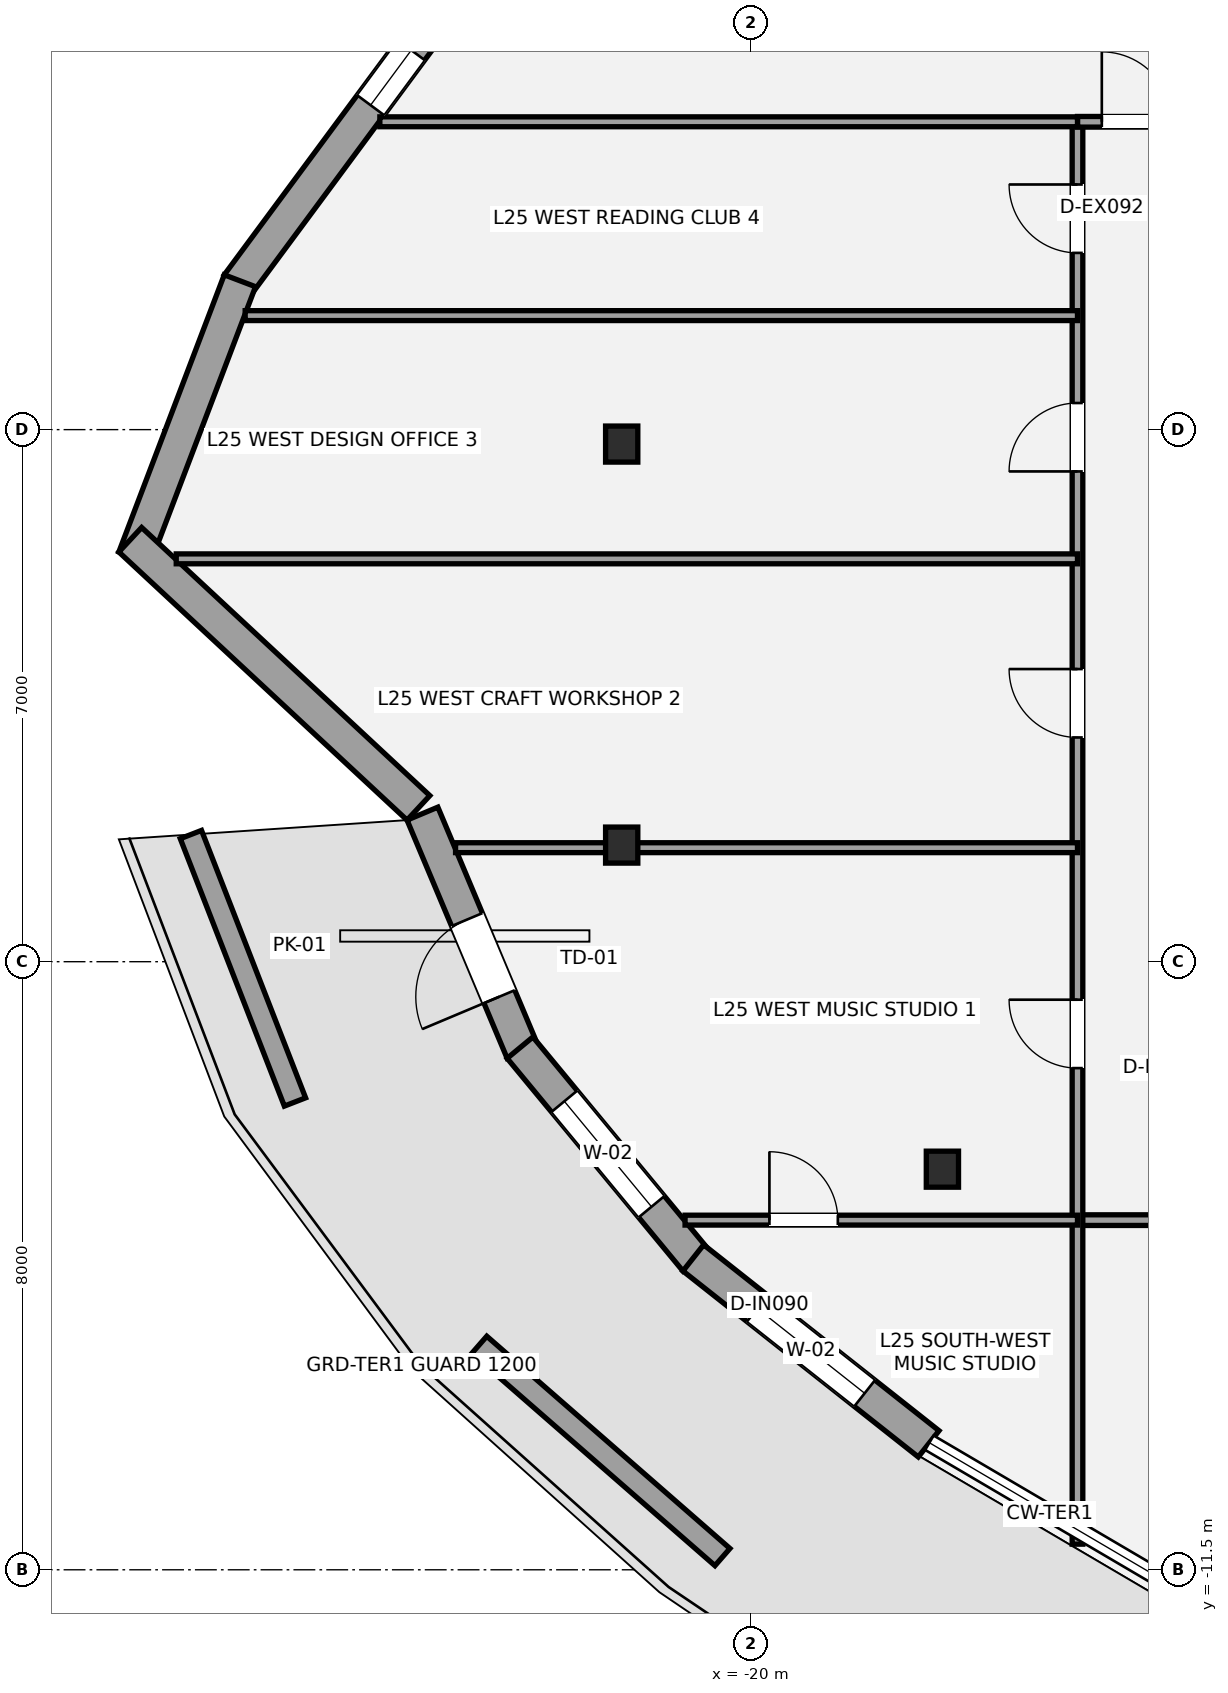
"""IFC4 building model, lengths in metres.
Left out: names, types, materials, properties, quantities, classifications, styles, units other than length and angle.
Written with IfcOpenShell. Run it as: python <this file> out.ifc"""

import sys

from ifc_helpers import new_model, si_unit, direction, frame, frame_2d, origin, origin_2d, place, context, subcontext, project, spatial, rectangle, i_section, extrude, element, fill, save


model = new_model("IFC4")
c1 = context("Model", 3, precision=1e-05, world=origin(), true_north=direction((0.0, 1.0)))
c2 = subcontext(c1, "Body", "Model", "MODEL_VIEW")
j1 = project(units=[si_unit("LENGTHUNIT", "METRE"), si_unit("PLANEANGLEUNIT", "RADIAN")], contexts=[c1])
p1 = place(None, origin())
s1 = spatial("IfcSite", under=j1, at=p1, CompositionType="ELEMENT")
p2 = place(p1, origin())
s2 = spatial("IfcBuilding", under=s1, at=p2, CompositionType="ELEMENT")
p3 = place(p2, frame((0.0, 0.0, 96.6)))
s3 = spatial("IfcBuildingStorey", under=s2, at=p3, CompositionType="ELEMENT", Elevation=96.6)
for number, where, z_axis, x_axis in (
    (1, (-21.697, 3.31, 0.0), (0.0, 0.0, 1.0), (1.0, 0.0, 0.0)),
    (2, (-21.697, -1.966, 0.0), (0.0, 0.0, 1.0), (1.0, 0.0, 0.0)),
    (3, (-17.477, -6.229, 0.0), (0.0, 0.0, 1.0), (1.0, 0.0, 0.0)),
):
    element("IfcColumn", number, at=place(p3, frame(where, z_axis=z_axis, x_axis=x_axis)), inside=s3, PredefinedType="COLUMN", context=c2, shape_type="SweptSolid", body=[
        extrude(i_section(OverallWidth=0.424, OverallDepth=0.474, WebThickness=0.048, FlangeThickness=0.077, at=origin_2d()), origin(), (0.0, 0.0, 1.0), 3.5),
    ])
p4 = place(p3, frame((-26.749, 5.406, 0.0), z_axis=(0.0, 0.0, 1.0), x_axis=(0.594853677057, 0.803834002075, 0.0)))
e4 = element("IfcWall", 4, at=p4, inside=s3, PredefinedType="STANDARD", context=c2, shape_type="SweptSolid", body=[
    extrude(rectangle(XDim=4.139, YDim=0.44, at=frame_2d((2.07, 0.0))), origin(), (0.0, 0.0, 1.0), 2.528),
])
p5 = place(p4, frame((2.939, 0.0, 0.58)))
e5 = element("IfcOpeningElement", 5, at=p5, cuts=e4, PredefinedType="OPENING", context=c2, shape_type="SweptSolid", body=[
    extrude(rectangle(XDim=0.9, YDim=1.35, at=frame_2d((0.45, 0.675))), frame((0.0, 0.23, 0.0), z_axis=(0.0, -1.0, 0.0), x_axis=(1.0, 0.0, 0.0)), (0.0, 0.0, 1.0), 0.46),
])
p6 = place(p3, frame((-28.107, 1.812, 0.0), z_axis=(0.0, 0.0, 1.0), x_axis=(0.355453982488, 0.93469378212, 0.0)))
e6 = element("IfcWall", 6, at=p6, inside=s3, PredefinedType="STANDARD", context=c2, shape_type="SweptSolid", body=[
    extrude(rectangle(XDim=3.901, YDim=0.44, at=frame_2d((1.951, 0.0))), origin(), (0.0, 0.0, 1.0), 2.528),
])
p7 = place(p3, frame((-24.371, -1.476, 0.0), z_axis=(0.0, 0.0, 1.0), x_axis=(-0.732150106649, 0.681143319231, 0.0)))
e7 = element("IfcWall", 7, at=p7, inside=s3, PredefinedType="STANDARD", context=c2, shape_type="SweptSolid", body=[
    extrude(rectangle(XDim=5.179, YDim=0.44, at=frame_2d((2.589, 0.0))), origin(), (0.0, 0.0, 1.0), 2.528),
])
p8 = place(p3, frame((-23.001, -4.686, 0.0), z_axis=(0.0, 0.0, 1.0), x_axis=(-0.387443695747, 0.92189336836, 0.0)))
e8 = element("IfcWall", 8, at=p8, inside=s3, PredefinedType="STANDARD", context=c2, shape_type="SweptSolid", body=[
    extrude(rectangle(XDim=3.4, YDim=0.44, at=frame_2d((1.7, 0.0))), origin(), (0.0, 0.0, 1.0), 2.532),
])
p9 = place(p8, frame((0.787, 0.0, 0.0)))
e9 = element("IfcOpeningElement", 9, at=p9, cuts=e8, PredefinedType="OPENING", context=c2, shape_type="SweptSolid", body=[
    extrude(rectangle(XDim=1.1, YDim=2.15, at=frame_2d((0.55, 1.075))), frame((0.0, 0.23, 0.0), z_axis=(0.0, -1.0, 0.0), x_axis=(1.0, 0.0, 0.0)), (0.0, 0.0, 1.0), 0.46),
])
p10 = place(p3, frame((-20.722, -7.429, 0.0), z_axis=(0.0, 0.0, 1.0), x_axis=(-0.637089984316, 0.770789434207, 0.0)))
e10 = element("IfcWall", 10, at=p10, inside=s3, PredefinedType="STANDARD", context=c2, shape_type="SweptSolid", body=[
    extrude(rectangle(XDim=3.63, YDim=0.44, at=frame_2d((1.815, 0.0))), origin(), (0.0, 0.0, 1.0), 2.532),
])
p11 = place(p10, frame((0.915, 0.0, 0.65)))
e11 = element("IfcOpeningElement", 11, at=p11, cuts=e10, PredefinedType="OPENING", context=c2, shape_type="SweptSolid", body=[
    extrude(rectangle(XDim=1.8, YDim=1.7, at=frame_2d((0.9, 0.85))), frame((0.0, 0.23, 0.0), z_axis=(0.0, -1.0, 0.0), x_axis=(1.0, 0.0, 0.0)), (0.0, 0.0, 1.0), 0.46),
])
p12 = place(p3, frame((-17.658, -9.843, 0.0), z_axis=(0.0, 0.0, 1.0), x_axis=(-0.784692700331, 0.619884961946, 0.0)))
e12 = element("IfcWall", 12, at=p12, inside=s3, PredefinedType="STANDARD", context=c2, shape_type="SweptSolid", body=[
    extrude(rectangle(XDim=3.946, YDim=0.44, at=frame_2d((1.973, 0.0))), origin(), (0.0, 0.0, 1.0), 2.532),
])
p13 = place(p12, frame((1.073, 0.0, 0.65)))
e13 = element("IfcOpeningElement", 13, at=p13, cuts=e12, PredefinedType="OPENING", context=c2, shape_type="SweptSolid", body=[
    extrude(rectangle(XDim=1.8, YDim=1.7, at=frame_2d((0.9, 0.85))), frame((0.0, 0.23, 0.0), z_axis=(0.0, -1.0, 0.0), x_axis=(1.0, 0.0, 0.0)), (0.0, 0.0, 1.0), 0.46),
])
p14 = place(p3, frame((-27.365, -1.827, 0.0), z_axis=(0.0, 0.0, 1.0), x_axis=(0.362633483576, -0.931931841172, 0.0)))
e14 = element("IfcWall", 14, at=p14, inside=s3, PredefinedType="PARAPET", context=c2, shape_type="SweptSolid", body=[
    extrude(rectangle(XDim=3.776, YDim=0.3, at=frame_2d((1.888, 0.0))), origin(), (0.0, 0.0, 1.0), 0.45),
])
p15 = place(p3, frame((-23.571, -8.54, 0.0), z_axis=(0.0, 0.0, 1.0), x_axis=(0.753398765677, -0.657563913149, 0.0)))
e15 = element("IfcWall", 15, at=p15, inside=s3, PredefinedType="PARAPET", context=c2, shape_type="SweptSolid", body=[
    extrude(rectangle(XDim=4.247, YDim=0.3, at=frame_2d((2.124, 0.0))), origin(), (0.0, 0.0, 1.0), 0.45),
])
p16 = place(p3, frame((-15.7, -6.9, 0.0), z_axis=(0.0, 0.0, 1.0), x_axis=(1.0, 0.0, 0.0)))
e16 = element("IfcWall", 16, at=p16, inside=s3, PredefinedType="PARTITIONING", context=c2, shape_type="SweptSolid", body=[
    extrude(rectangle(XDim=33.2, YDim=0.14, at=frame_2d((16.6, 0.0))), origin(), (0.0, 0.0, 1.0), 2.688),
])
p17 = place(p16, frame((3.15, 0.0, 0.0)))
e17 = element("IfcOpeningElement", 17, at=p17, cuts=e16, PredefinedType="OPENING", context=c2, shape_type="SweptSolid", body=[
    extrude(rectangle(XDim=0.9, YDim=2.1, at=frame_2d((0.45, 1.05))), frame((0.0, 0.08, 0.0), z_axis=(0.0, -1.0, 0.0), x_axis=(1.0, 0.0, 0.0)), (0.0, 0.0, 1.0), 0.16),
])
p18 = place(p16, frame((11.0, 0.0, 0.0)))
e18 = element("IfcOpeningElement", 18, at=p18, cuts=e16, PredefinedType="OPENING", context=c2, shape_type="SweptSolid", body=[
    extrude(rectangle(XDim=0.9, YDim=2.1, at=frame_2d((0.45, 1.05))), frame((0.0, 0.08, 0.0), z_axis=(0.0, -1.0, 0.0), x_axis=(1.0, 0.0, 0.0)), (0.0, 0.0, 1.0), 0.16),
])
p19 = place(p16, frame((19.5, 0.0, 0.0)))
e19 = element("IfcOpeningElement", 19, at=p19, cuts=e16, PredefinedType="OPENING", context=c2, shape_type="SweptSolid", body=[
    extrude(rectangle(XDim=0.9, YDim=2.1, at=frame_2d((0.45, 1.05))), frame((0.0, 0.08, 0.0), z_axis=(0.0, -1.0, 0.0), x_axis=(1.0, 0.0, 0.0)), (0.0, 0.0, 1.0), 0.16),
])
p20 = place(p16, frame((27.95, 0.0, 0.0)))
e20 = element("IfcOpeningElement", 20, at=p20, cuts=e16, PredefinedType="OPENING", context=c2, shape_type="SweptSolid", body=[
    extrude(rectangle(XDim=1.5, YDim=2.15, at=frame_2d((0.75, 1.075))), frame((0.0, 0.08, 0.0), z_axis=(0.0, -1.0, 0.0), x_axis=(1.0, 0.0, 0.0)), (0.0, 0.0, 1.0), 0.16),
])
p21 = place(p3, frame((-15.7, -11.163, 0.0), z_axis=(0.0, 0.0, 1.0), x_axis=(0.0, 1.0, 0.0)))
e21 = element("IfcWall", 21, at=p21, inside=s3, PredefinedType="PARTITIONING", context=c2, shape_type="SweptSolid", body=[
    extrude(rectangle(XDim=18.713, YDim=0.14, at=frame_2d((9.356, 0.0))), origin(), (0.0, 0.0, 1.0), 2.751),
])
p22 = place(p21, frame((6.263, 0.0, 0.0)))
e22 = element("IfcOpeningElement", 22, at=p22, cuts=e21, PredefinedType="OPENING", context=c2, shape_type="SweptSolid", body=[
    extrude(rectangle(XDim=0.9, YDim=2.1, at=frame_2d((0.45, 1.05))), frame((0.0, 0.08, 0.0), z_axis=(0.0, -1.0, 0.0), x_axis=(1.0, 0.0, 0.0)), (0.0, 0.0, 1.0), 0.16),
])
p23 = place(p21, frame((10.613, 0.0, 0.0)))
e23 = element("IfcOpeningElement", 23, at=p23, cuts=e21, PredefinedType="OPENING", context=c2, shape_type="SweptSolid", body=[
    extrude(rectangle(XDim=0.9, YDim=2.1, at=frame_2d((0.45, 1.05))), frame((0.0, 0.08, 0.0), z_axis=(0.0, -1.0, 0.0), x_axis=(1.0, 0.0, 0.0)), (0.0, 0.0, 1.0), 0.16),
])
p24 = place(p21, frame((14.113, 0.0, 0.0)))
e24 = element("IfcOpeningElement", 24, at=p24, cuts=e21, PredefinedType="OPENING", context=c2, shape_type="SweptSolid", body=[
    extrude(rectangle(XDim=0.9, YDim=2.1, at=frame_2d((0.45, 1.05))), frame((0.0, 0.08, 0.0), z_axis=(0.0, -1.0, 0.0), x_axis=(1.0, 0.0, 0.0)), (0.0, 0.0, 1.0), 0.16),
])
p25 = place(p21, frame((16.988, 0.0, 0.0)))
e25 = element("IfcOpeningElement", 25, at=p25, cuts=e21, PredefinedType="OPENING", context=c2, shape_type="SweptSolid", body=[
    extrude(rectangle(XDim=0.9, YDim=2.1, at=frame_2d((0.45, 1.05))), frame((0.0, 0.08, 0.0), z_axis=(0.0, -1.0, 0.0), x_axis=(1.0, 0.0, 0.0)), (0.0, 0.0, 1.0), 0.16),
])
p26 = place(p3, frame((-15.7, 7.55, 0.0), z_axis=(0.0, 0.0, 1.0), x_axis=(1.0, 0.0, 0.0)))
e26 = element("IfcWall", 26, at=p26, inside=s3, PredefinedType="PARTITIONING", context=c2, shape_type="SweptSolid", body=[
    extrude(rectangle(XDim=1.8, YDim=0.14, at=frame_2d((0.9, 0.0))), origin(), (0.0, 0.0, 1.0), 3.31),
])
p27 = place(p26, frame((0.32, 0.0, 0.0)))
e27 = element("IfcOpeningElement", 27, at=p27, cuts=e26, PredefinedType="OPENING", context=c2, shape_type="SweptSolid", body=[
    extrude(rectangle(XDim=0.92, YDim=2.15, at=frame_2d((0.46, 1.075))), frame((0.0, 0.08, 0.0), z_axis=(0.0, -1.0, 0.0), x_axis=(1.0, 0.0, 0.0)), (0.0, 0.0, 1.0), 0.16),
])
p28 = place(p3, frame((-24.879, 7.55, 0.0), z_axis=(0.0, 0.0, 1.0), x_axis=(1.0, 0.0, 0.0)))
e28 = element("IfcWall", 28, at=p28, inside=s3, PredefinedType="PARTITIONING", context=c2, shape_type="SweptSolid", body=[
    extrude(rectangle(XDim=9.179, YDim=0.13, at=frame_2d((4.589, 0.0))), origin(), (0.0, 0.0, 1.0), 2.763),
])
p29 = place(p3, frame((-20.863, -6.9, 0.0), z_axis=(0.0, 0.0, 1.0), x_axis=(1.0, 0.0, 0.0)))
e29 = element("IfcWall", 29, at=p29, inside=s3, PredefinedType="PARTITIONING", context=c2, shape_type="SweptSolid", body=[
    extrude(rectangle(XDim=5.163, YDim=0.13, at=frame_2d((2.582, 0.0))), origin(), (0.0, 0.0, 1.0), 2.688),
])
p30 = place(p29, frame((1.11, 0.0, 0.0)))
e30 = element("IfcOpeningElement", 30, at=p30, cuts=e29, PredefinedType="OPENING", context=c2, shape_type="SweptSolid", body=[
    extrude(rectangle(XDim=0.9, YDim=2.1, at=frame_2d((0.45, 1.05))), frame((0.0, 0.075, 0.0), z_axis=(0.0, -1.0, 0.0), x_axis=(1.0, 0.0, 0.0)), (0.0, 0.0, 1.0), 0.15),
])
p31 = place(p3, frame((-23.883, -2.0, 0.0), z_axis=(0.0, 0.0, 1.0), x_axis=(1.0, 0.0, 0.0)))
e31 = element("IfcWall", 31, at=p31, inside=s3, PredefinedType="PARTITIONING", context=c2, shape_type="SweptSolid", body=[
    extrude(rectangle(XDim=8.183, YDim=0.13, at=frame_2d((4.091, 0.0))), origin(), (0.0, 0.0, 1.0), 2.688),
])
p32 = place(p3, frame((-27.558, 1.8, 0.0), z_axis=(0.0, 0.0, 1.0), x_axis=(1.0, 0.0, 0.0)))
e32 = element("IfcWall", 32, at=p32, inside=s3, PredefinedType="PARTITIONING", context=c2, shape_type="SweptSolid", body=[
    extrude(rectangle(XDim=11.858, YDim=0.13, at=frame_2d((5.929, 0.0))), origin(), (0.0, 0.0, 1.0), 2.751),
])
p33 = place(p3, frame((-26.651, 5.0, 0.0), z_axis=(0.0, 0.0, 1.0), x_axis=(1.0, 0.0, 0.0)))
e33 = element("IfcWall", 33, at=p33, inside=s3, PredefinedType="PARTITIONING", context=c2, shape_type="SweptSolid", body=[
    extrude(rectangle(XDim=10.951, YDim=0.13, at=frame_2d((5.476, 0.0))), origin(), (0.0, 0.0, 1.0), 3.31),
])
p34 = place(p5, origin())
e34 = element("IfcWindow", 34, at=p34, inside=s3, PartitioningType="SINGLE_PANEL", PredefinedType="WINDOW", context=c2, shape_type="SweptSolid", body=[
    extrude(rectangle(XDim=0.9, YDim=1.35, at=frame_2d((0.45, 0.675))), frame((0.0, -0.01, 0.0), z_axis=(0.0, -1.0, 0.0), x_axis=(1.0, 0.0, 0.0)), (0.0, 0.0, 1.0), 0.06),
])
fill(e5, e34)
p35 = place(p9, origin())
e35 = element("IfcDoor", 35, at=p35, inside=s3, OperationType="SINGLE_SWING_LEFT", PredefinedType="DOOR", context=c2, shape_type="SweptSolid", body=[
    extrude(rectangle(XDim=1.1, YDim=2.15, at=frame_2d((0.55, 1.075))), frame((0.0, 0.025, 0.0), z_axis=(0.0, -1.0, 0.0), x_axis=(1.0, 0.0, 0.0)), (0.0, 0.0, 1.0), 0.05),
])
fill(e9, e35)
p36 = place(p11, origin())
e36 = element("IfcWindow", 36, at=p36, inside=s3, PartitioningType="SINGLE_PANEL", PredefinedType="WINDOW", context=c2, shape_type="SweptSolid", body=[
    extrude(rectangle(XDim=1.8, YDim=1.7, at=frame_2d((0.9, 0.85))), frame((0.0, -0.01, 0.0), z_axis=(0.0, -1.0, 0.0), x_axis=(1.0, 0.0, 0.0)), (0.0, 0.0, 1.0), 0.06),
])
fill(e11, e36)
p37 = place(p13, origin())
e37 = element("IfcWindow", 37, at=p37, inside=s3, PartitioningType="SINGLE_PANEL", PredefinedType="WINDOW", context=c2, shape_type="SweptSolid", body=[
    extrude(rectangle(XDim=1.8, YDim=1.7, at=frame_2d((0.9, 0.85))), frame((0.0, -0.01, 0.0), z_axis=(0.0, -1.0, 0.0), x_axis=(1.0, 0.0, 0.0)), (0.0, 0.0, 1.0), 0.06),
])
fill(e13, e37)
p38 = place(p27, origin())
e38 = element("IfcDoor", 38, at=p38, inside=s3, OperationType="SINGLE_SWING_LEFT", PredefinedType="DOOR", context=c2, shape_type="SweptSolid", body=[
    extrude(rectangle(XDim=0.92, YDim=2.15, at=frame_2d((0.46, 1.075))), frame((0.0, 0.025, 0.0), z_axis=(0.0, -1.0, 0.0), x_axis=(1.0, 0.0, 0.0)), (0.0, 0.0, 1.0), 0.05),
])
fill(e27, e38)
p39 = place(p30, origin())
e39 = element("IfcDoor", 39, at=p39, inside=s3, OperationType="SINGLE_SWING_LEFT", PredefinedType="DOOR", context=c2, shape_type="SweptSolid", body=[
    extrude(rectangle(XDim=0.9, YDim=2.1, at=frame_2d((0.45, 1.05))), frame((0.0, 0.025, 0.0), z_axis=(0.0, -1.0, 0.0), x_axis=(1.0, 0.0, 0.0)), (0.0, 0.0, 1.0), 0.05),
])
fill(e30, e39)
p40 = place(p22, origin())
e40 = element("IfcDoor", 40, at=p40, inside=s3, OperationType="SINGLE_SWING_RIGHT", PredefinedType="DOOR", context=c2, shape_type="SweptSolid", body=[
    extrude(rectangle(XDim=0.9, YDim=2.1, at=frame_2d((0.45, 1.05))), frame((0.0, 0.025, 0.0), z_axis=(0.0, -1.0, 0.0), x_axis=(1.0, 0.0, 0.0)), (0.0, 0.0, 1.0), 0.05),
])
fill(e22, e40)
p41 = place(p23, origin())
e41 = element("IfcDoor", 41, at=p41, inside=s3, OperationType="SINGLE_SWING_RIGHT", PredefinedType="DOOR", context=c2, shape_type="SweptSolid", body=[
    extrude(rectangle(XDim=0.9, YDim=2.1, at=frame_2d((0.45, 1.05))), frame((0.0, 0.025, 0.0), z_axis=(0.0, -1.0, 0.0), x_axis=(1.0, 0.0, 0.0)), (0.0, 0.0, 1.0), 0.05),
])
fill(e23, e41)
p42 = place(p24, origin())
e42 = element("IfcDoor", 42, at=p42, inside=s3, OperationType="SINGLE_SWING_LEFT", PredefinedType="DOOR", context=c2, shape_type="SweptSolid", body=[
    extrude(rectangle(XDim=0.9, YDim=2.1, at=frame_2d((0.45, 1.05))), frame((0.0, 0.025, 0.0), z_axis=(0.0, -1.0, 0.0), x_axis=(1.0, 0.0, 0.0)), (0.0, 0.0, 1.0), 0.05),
])
fill(e24, e42)
p43 = place(p25, origin())
e43 = element("IfcDoor", 43, at=p43, inside=s3, OperationType="SINGLE_SWING_RIGHT", PredefinedType="DOOR", context=c2, shape_type="SweptSolid", body=[
    extrude(rectangle(XDim=0.9, YDim=2.1, at=frame_2d((0.45, 1.05))), frame((0.0, 0.025, 0.0), z_axis=(0.0, -1.0, 0.0), x_axis=(1.0, 0.0, 0.0)), (0.0, 0.0, 1.0), 0.05),
])
fill(e25, e43)
save(model, sys.argv[1])
